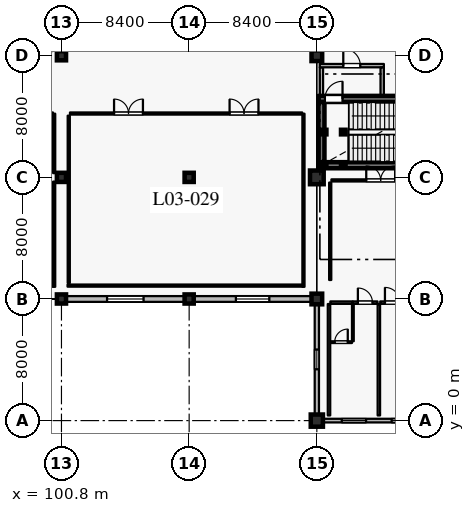
"""IFC4 building model, lengths in metres.
Left out: names, types, materials, properties, quantities, classifications, styles, units other than length and angle.
Written with IfcOpenShell. Run it as: python <this file> out.ifc"""

import sys

from ifc_helpers import new_model, si_unit, direction, frame, frame_2d, origin, origin_2d, place, context, subcontext, project, spatial, rectangle, hollow_rectangle, extrude, element, fill, save


model = new_model("IFC4")
c1 = context("Model", 3, precision=1e-05, world=origin(), true_north=direction((0.0, 1.0)))
c2 = subcontext(c1, "Body", "Model", "MODEL_VIEW")
j1 = project(units=[si_unit("LENGTHUNIT", "METRE"), si_unit("PLANEANGLEUNIT", "RADIAN")], contexts=[c1])
p1 = place(None, origin())
s1 = spatial("IfcSite", under=j1, at=p1, CompositionType="ELEMENT")
p2 = place(p1, origin())
s2 = spatial("IfcBuilding", under=s1, at=p2, CompositionType="ELEMENT")
p3 = place(p2, frame((0.0, 0.0, 16.2)))
s3 = spatial("IfcBuildingStorey", under=s2, at=p3, CompositionType="ELEMENT", Elevation=16.2)
for number, where, z_axis, x_axis in (
    (1, (100.8, 8.0, 0.0), (0.0, 0.0, 1.0), (1.0, 0.0, 0.0)),
    (2, (100.8, 16.0, 0.0), (0.0, 0.0, 1.0), (1.0, 0.0, 0.0)),
    (3, (100.8, 24.0, 0.0), (0.0, 0.0, 1.0), (1.0, 0.0, 0.0)),
    (4, (109.2, 8.0, 0.0), (0.0, 0.0, 1.0), (1.0, 0.0, 0.0)),
    (5, (109.2, 16.0, 0.0), (0.0, 0.0, 1.0), (1.0, 0.0, 0.0)),
):
    element("IfcColumn", number, at=place(p3, frame(where, z_axis=z_axis, x_axis=x_axis)), inside=s3, PredefinedType="COLUMN", context=c2, shape_type="SweptSolid", body=[
        extrude(rectangle(XDim=0.6, YDim=0.6, at=origin_2d()), origin(), (0.0, 0.0, 1.0), 4.8),
    ])
p4 = place(p3, frame((117.6, 0.0, 0.0), z_axis=(0.0, 0.0, 1.0), x_axis=(1.0, 0.0, 0.0)))
e6 = element("IfcColumn", 6, at=p4, inside=s3, PredefinedType="COLUMN", context=c2, shape_type="SweptSolid", body=[
    extrude(rectangle(XDim=0.8, YDim=0.8, at=origin_2d()), origin(), (0.0, 0.0, 1.0), 4.8),
])
p5 = place(p3, frame((117.6, 16.0, 0.0), z_axis=(0.0, 0.0, 1.0), x_axis=(1.0, 0.0, 0.0)))
e7 = element("IfcColumn", 7, at=p5, inside=s3, PredefinedType="COLUMN", context=c2, shape_type="SweptSolid", body=[
    extrude(rectangle(XDim=0.9, YDim=0.9, at=origin_2d()), origin(), (0.0, 0.0, 1.0), 4.8),
])
for number, where, z_axis, x_axis in (
    (8, (117.6, 8.0, 0.0), (0.0, 0.0, 1.0), (1.0, 0.0, 0.0)),
    (9, (117.6, 24.0, 0.0), (0.0, 0.0, 1.0), (1.0, 0.0, 0.0)),
):
    element("IfcColumn", number, at=place(p3, frame(where, z_axis=z_axis, x_axis=x_axis)), inside=s3, PredefinedType="COLUMN", context=c2, shape_type="SweptSolid", body=[
        extrude(rectangle(XDim=0.7, YDim=0.7, at=origin_2d()), origin(), (0.0, 0.0, 1.0), 4.8),
    ])
p6 = place(p3, frame((117.25, 8.0, 0.0), z_axis=(0.0, 0.0, 1.0), x_axis=(-1.0, 0.0, 0.0)))
e10 = element("IfcWall", 10, at=p6, inside=s3, PredefinedType="SOLIDWALL", context=c2, shape_type="SweptSolid", body=[
    extrude(rectangle(XDim=7.75, YDim=0.38, at=frame_2d((3.875, 0.0))), origin(), (0.0, 0.0, 1.0), 3.84),
])
p7 = place(p6, frame((2.775, 0.0, 0.95)))
e11 = element("IfcOpeningElement", 11, at=p7, cuts=e10, PredefinedType="OPENING", context=c2, shape_type="SweptSolid", body=[
    extrude(rectangle(XDim=2.2, YDim=1.75, at=frame_2d((1.1, 0.875))), frame((0.0, 0.2, 0.0), z_axis=(0.0, -1.0, 0.0), x_axis=(1.0, 0.0, 0.0)), (0.0, 0.0, 1.0), 0.4),
])
p8 = place(p3, frame((108.9, 8.0, 0.0), z_axis=(0.0, 0.0, 1.0), x_axis=(-1.0, 0.0, 0.0)))
e12 = element("IfcWall", 12, at=p8, inside=s3, PredefinedType="SOLIDWALL", context=c2, shape_type="SweptSolid", body=[
    extrude(rectangle(XDim=7.8, YDim=0.38, at=frame_2d((3.9, 0.0))), origin(), (0.0, 0.0, 1.0), 3.84),
])
p9 = place(p8, frame((2.7, 0.0, 0.95)))
e13 = element("IfcOpeningElement", 13, at=p9, cuts=e12, PredefinedType="OPENING", context=c2, shape_type="SweptSolid", body=[
    extrude(rectangle(XDim=2.4, YDim=1.65, at=frame_2d((1.2, 0.825))), frame((0.0, 0.2, 0.0), z_axis=(0.0, -1.0, 0.0), x_axis=(1.0, 0.0, 0.0)), (0.0, 0.0, 1.0), 0.4),
])
p10 = place(p3, frame((125.6, 0.0, 0.0), z_axis=(0.0, 0.0, 1.0), x_axis=(-1.0, 0.0, 0.0)))
e14 = element("IfcWall", 14, at=p10, inside=s3, PredefinedType="SOLIDWALL", context=c2, shape_type="SweptSolid", body=[
    extrude(rectangle(XDim=7.6, YDim=0.24, at=frame_2d((3.8, 0.0))), origin(), (0.0, 0.0, 1.0), 4.13),
])
p11 = place(p10, frame((1.48, 0.0, 0.8)))
e15 = element("IfcOpeningElement", 15, at=p11, cuts=e14, PredefinedType="OPENING", context=c2, shape_type="SweptSolid", body=[
    extrude(rectangle(XDim=1.6, YDim=1.6, at=frame_2d((0.8, 0.8))), frame((0.0, 0.13, 0.0), z_axis=(0.0, -1.0, 0.0), x_axis=(1.0, 0.0, 0.0)), (0.0, 0.0, 1.0), 0.26),
])
p12 = place(p10, frame((4.76, 0.0, 0.8)))
e16 = element("IfcOpeningElement", 16, at=p12, cuts=e14, PredefinedType="OPENING", context=c2, shape_type="SweptSolid", body=[
    extrude(rectangle(XDim=1.6, YDim=1.6, at=frame_2d((0.8, 0.8))), frame((0.0, 0.13, 0.0), z_axis=(0.0, -1.0, 0.0), x_axis=(1.0, 0.0, 0.0)), (0.0, 0.0, 1.0), 0.26),
])
p13 = place(p3, frame((117.6, 0.4, 0.0), z_axis=(0.0, 0.0, 1.0), x_axis=(0.0, 1.0, 0.0)))
e17 = element("IfcWall", 17, at=p13, inside=s3, PredefinedType="SOLIDWALL", context=c2, shape_type="SweptSolid", body=[
    extrude(rectangle(XDim=7.25, YDim=0.28, at=frame_2d((3.625, 0.0))), origin(), (0.0, 0.0, 1.0), 3.9),
])
p14 = place(p13, frame((2.975, 0.0, 0.75)))
e18 = element("IfcOpeningElement", 18, at=p14, cuts=e17, PredefinedType="OPENING", context=c2, shape_type="SweptSolid", body=[
    extrude(rectangle(XDim=1.3, YDim=1.65, at=frame_2d((0.65, 0.825))), frame((0.0, 0.15, 0.0), z_axis=(0.0, -1.0, 0.0), x_axis=(1.0, 0.0, 0.0)), (0.0, 0.0, 1.0), 0.3),
])
p15 = place(p3, frame((117.7, 16.8, 0.0), z_axis=(0.0, 0.0, 1.0), x_axis=(1.0, 0.0, 0.0)))
e19 = element("IfcWall", 19, at=p15, inside=s3, PredefinedType="SHEAR", context=c2, shape_type="SweptSolid", body=[
    extrude(rectangle(XDim=8.2, YDim=0.4, at=frame_2d((4.1, 0.0))), origin(), (0.0, 0.0, 1.0), 4.535),
])
p16 = place(p3, frame((117.7, 21.16, 0.0), z_axis=(0.0, 0.0, 1.0), x_axis=(1.0, 0.0, 0.0)))
e20 = element("IfcWall", 20, at=p16, inside=s3, PredefinedType="SHEAR", context=c2, shape_type="SweptSolid", body=[
    extrude(rectangle(XDim=8.2, YDim=0.4, at=frame_2d((4.1, 0.0))), origin(), (0.0, 0.0, 1.0), 4.535),
])
p17 = place(p16, frame((0.43, 0.0, 0.0)))
e21 = element("IfcOpeningElement", 21, at=p17, cuts=e20, PredefinedType="OPENING", context=c2, shape_type="SweptSolid", body=[
    extrude(rectangle(XDim=1.16, YDim=2.2, at=frame_2d((0.58, 1.1))), frame((0.0, 0.21, 0.0), z_axis=(0.0, -1.0, 0.0), x_axis=(1.0, 0.0, 0.0)), (0.0, 0.0, 1.0), 0.42),
])
p18 = place(p3, frame((117.9, 17.005, 0.0), z_axis=(0.0, 0.0, 1.0), x_axis=(0.0, 1.0, 0.0)))
e22 = element("IfcWall", 22, at=p18, inside=s3, PredefinedType="SHEAR", context=c2, shape_type="SweptSolid", body=[
    extrude(rectangle(XDim=3.95, YDim=0.4, at=frame_2d((1.975, 0.0))), origin(), (0.0, 0.0, 1.0), 4.535),
])
p19 = place(p3, frame((117.9, 21.365, 0.0), z_axis=(0.0, 0.0, 1.0), x_axis=(0.0, 1.0, 0.0)))
e23 = element("IfcWall", 23, at=p19, inside=s3, PredefinedType="PARTITIONING", context=c2, shape_type="SweptSolid", body=[
    extrude(rectangle(XDim=1.87, YDim=0.22, at=frame_2d((0.935, 0.0))), origin(), (0.0, 0.0, 1.0), 4.535),
])
p20 = place(p3, frame((117.79, 23.35, 0.0), z_axis=(0.0, 0.0, 1.0), x_axis=(1.0, 0.0, 0.0)))
e24 = element("IfcWall", 24, at=p20, inside=s3, PredefinedType="PARTITIONING", context=c2, shape_type="SweptSolid", body=[
    extrude(rectangle(XDim=4.22, YDim=0.22, at=frame_2d((2.11, 0.0))), origin(), (0.0, 0.0, 1.0), 4.535),
])
p21 = place(p20, frame((1.55, 0.0, 0.0)))
e25 = element("IfcOpeningElement", 25, at=p21, cuts=e24, PredefinedType="OPENING", context=c2, shape_type="SweptSolid", body=[
    extrude(rectangle(XDim=1.12, YDim=2.2, at=frame_2d((0.56, 1.1))), frame((0.0, 0.12, 0.0), z_axis=(0.0, -1.0, 0.0), x_axis=(1.0, 0.0, 0.0)), (0.0, 0.0, 1.0), 0.24),
])
p22 = place(p3, frame((121.9, 21.365, 0.0), z_axis=(0.0, 0.0, 1.0), x_axis=(0.0, 1.0, 0.0)))
e26 = element("IfcWall", 26, at=p22, inside=s3, PredefinedType="PARTITIONING", context=c2, shape_type="SweptSolid", body=[
    extrude(rectangle(XDim=1.87, YDim=0.22, at=frame_2d((0.935, 0.0))), origin(), (0.0, 0.0, 1.0), 4.535),
])
for number, where, z_axis, x_axis in (
    (27, (118.08, 16.8, 0.0), (0.0, 0.0, 1.0), (1.0, 0.0, 0.0)),
    (28, (118.08, 18.98, 0.0), (0.0, 0.0, 1.0), (1.0, 0.0, 0.0)),
    (29, (119.34, 16.8, 0.0), (0.0, 0.0, 1.0), (1.0, 0.0, 0.0)),
    (30, (119.34, 18.98, 0.0), (0.0, 0.0, 1.0), (1.0, 0.0, 0.0)),
):
    element("IfcColumn", number, at=place(p3, frame(where, z_axis=z_axis, x_axis=x_axis)), inside=s3, PredefinedType="COLUMN", context=c2, shape_type="SweptSolid", body=[
        extrude(hollow_rectangle(XDim=0.3, YDim=0.3, WallThickness=0.012, at=origin_2d()), origin(), (0.0, 0.0, 1.0), 4.62),
    ])
p23 = place(p3, frame((118.49, 7.76, 0.0), z_axis=(0.0, 0.0, 1.0), x_axis=(1.0, 0.0, 0.0)))
e31 = element("IfcWall", 31, at=p23, inside=s3, PredefinedType="PARTITIONING", context=c2, shape_type="SweptSolid", body=[
    extrude(rectangle(XDim=1.47, YDim=0.16, at=frame_2d((0.735, 0.0))), origin(), (0.0, 0.0, 1.0), 4.535),
])
p24 = place(p3, frame((119.97, 7.76, 0.0), z_axis=(0.0, 0.0, 1.0), x_axis=(1.0, 0.0, 0.0)))
e32 = element("IfcWall", 32, at=p24, inside=s3, PredefinedType="PARTITIONING", context=c2, shape_type="SweptSolid", body=[
    extrude(rectangle(XDim=1.62, YDim=0.16, at=frame_2d((0.81, 0.0))), origin(), (0.0, 0.0, 1.0), 4.535),
])
p25 = place(p24, frame((0.33, 0.0, 0.0)))
e33 = element("IfcOpeningElement", 33, at=p25, cuts=e32, PredefinedType="OPENING", context=c2, shape_type="SweptSolid", body=[
    extrude(rectangle(XDim=0.96, YDim=2.2, at=frame_2d((0.48, 1.1))), frame((0.0, 0.09, 0.0), z_axis=(0.0, -1.0, 0.0), x_axis=(1.0, 0.0, 0.0)), (0.0, 0.0, 1.0), 0.18),
])
p26 = place(p3, frame((119.97, 5.22, 0.0), z_axis=(0.0, 0.0, 1.0), x_axis=(0.0, 1.0, 0.0)))
e34 = element("IfcWall", 34, at=p26, inside=s3, PredefinedType="PARTITIONING", context=c2, shape_type="SweptSolid", body=[
    extrude(rectangle(XDim=2.45, YDim=0.115, at=frame_2d((1.225, 0.0))), origin(), (0.0, 0.0, 1.0), 4.535),
])
p27 = place(p3, frame((118.5, 5.16, 0.0), z_axis=(0.0, 0.0, 1.0), x_axis=(1.0, 0.0, 0.0)))
e35 = element("IfcWall", 35, at=p27, inside=s3, PredefinedType="PARTITIONING", context=c2, shape_type="SweptSolid", body=[
    extrude(rectangle(XDim=1.41, YDim=0.115, at=frame_2d((0.705, 0.0))), origin(), (0.0, 0.0, 1.0), 4.535),
])
p28 = place(p27, frame((0.275, 0.0, 0.0)))
e36 = element("IfcOpeningElement", 36, at=p28, cuts=e35, PredefinedType="OPENING", context=c2, shape_type="SweptSolid", body=[
    extrude(rectangle(XDim=0.86, YDim=2.12, at=frame_2d((0.43, 1.06))), frame((0.0, 0.067, 0.0), z_axis=(0.0, -1.0, 0.0), x_axis=(1.0, 0.0, 0.0)), (0.0, 0.0, 1.0), 0.135),
])
p29 = place(p3, frame((118.4, 0.34, 0.0), z_axis=(0.0, 0.0, 1.0), x_axis=(0.0, 1.0, 0.0)))
e37 = element("IfcWall", 37, at=p29, inside=s3, PredefinedType="PARTITIONING", context=c2, shape_type="SweptSolid", body=[
    extrude(rectangle(XDim=7.33, YDim=0.16, at=frame_2d((3.665, 0.0))), origin(), (0.0, 0.0, 1.0), 4.535),
])
p30 = place(p3, frame((121.77, 7.76, 0.0), z_axis=(0.0, 0.0, 1.0), x_axis=(1.0, 0.0, 0.0)))
e38 = element("IfcWall", 38, at=p30, inside=s3, PredefinedType="PARTITIONING", context=c2, shape_type="SweptSolid", body=[
    extrude(rectangle(XDim=1.62, YDim=0.16, at=frame_2d((0.81, 0.0))), origin(), (0.0, 0.0, 1.0), 4.535),
])
p31 = place(p30, frame((0.31, 0.0, 0.0)))
e39 = element("IfcOpeningElement", 39, at=p31, cuts=e38, PredefinedType="OPENING", context=c2, shape_type="SweptSolid", body=[
    extrude(rectangle(XDim=1.0, YDim=2.25, at=frame_2d((0.5, 1.125))), frame((0.0, 0.09, 0.0), z_axis=(0.0, -1.0, 0.0), x_axis=(1.0, 0.0, 0.0)), (0.0, 0.0, 1.0), 0.18),
])
p32 = place(p3, frame((121.68, 0.34, 0.0), z_axis=(0.0, 0.0, 1.0), x_axis=(0.0, 1.0, 0.0)))
e40 = element("IfcWall", 40, at=p32, inside=s3, PredefinedType="PARTITIONING", context=c2, shape_type="SweptSolid", body=[
    extrude(rectangle(XDim=7.33, YDim=0.16, at=frame_2d((3.665, 0.0))), origin(), (0.0, 0.0, 1.0), 4.535),
])
p33 = place(p3, frame((84.56, 20.2, 0.0), z_axis=(0.0, 0.0, 1.0), x_axis=(1.0, 0.0, 0.0)))
e41 = element("IfcWall", 41, at=p33, inside=s3, PredefinedType="PARTITIONING", context=c2, shape_type="SweptSolid", body=[
    extrude(rectangle(XDim=15.68, YDim=0.14, at=frame_2d((7.84, 0.0))), origin(), (0.0, 0.0, 1.0), 4.535),
])
p34 = place(p33, frame((6.89, 0.0, 0.0)))
e42 = element("IfcOpeningElement", 42, at=p34, cuts=e41, PredefinedType="OPENING", context=c2, shape_type="SweptSolid", body=[
    extrude(rectangle(XDim=1.9, YDim=2.4, at=frame_2d((0.95, 1.2))), frame((0.0, 0.08, 0.0), z_axis=(0.0, -1.0, 0.0), x_axis=(1.0, 0.0, 0.0)), (0.0, 0.0, 1.0), 0.16),
])
p35 = place(p3, frame((101.36, 20.2, 0.0), z_axis=(0.0, 0.0, 1.0), x_axis=(1.0, 0.0, 0.0)))
e43 = element("IfcWall", 43, at=p35, inside=s3, PredefinedType="PARTITIONING", context=c2, shape_type="SweptSolid", body=[
    extrude(rectangle(XDim=15.28, YDim=0.14, at=frame_2d((7.64, 0.0))), origin(), (0.0, 0.0, 1.0), 4.535),
])
p36 = place(p35, frame((2.9, 0.0, 0.0)))
e44 = element("IfcOpeningElement", 44, at=p36, cuts=e43, PredefinedType="OPENING", context=c2, shape_type="SweptSolid", body=[
    extrude(rectangle(XDim=1.9, YDim=2.4, at=frame_2d((0.95, 1.2))), frame((0.0, 0.08, 0.0), z_axis=(0.0, -1.0, 0.0), x_axis=(1.0, 0.0, 0.0)), (0.0, 0.0, 1.0), 0.16),
])
p37 = place(p35, frame((10.5, 0.0, 0.0)))
e45 = element("IfcOpeningElement", 45, at=p37, cuts=e43, PredefinedType="OPENING", context=c2, shape_type="SweptSolid", body=[
    extrude(rectangle(XDim=1.9, YDim=2.4, at=frame_2d((0.95, 1.2))), frame((0.0, 0.08, 0.0), z_axis=(0.0, -1.0, 0.0), x_axis=(1.0, 0.0, 0.0)), (0.0, 0.0, 1.0), 0.16),
])
p38 = place(p3, frame((101.28, 9.05, 0.0), z_axis=(0.0, 0.0, 1.0), x_axis=(0.0, 1.0, 0.0)))
e46 = element("IfcWall", 46, at=p38, inside=s3, PredefinedType="PARTITIONING", context=c2, shape_type="SweptSolid", body=[
    extrude(rectangle(XDim=11.01, YDim=0.14, at=frame_2d((5.505, 0.0))), origin(), (0.0, 0.0, 1.0), 4.535),
])
p39 = place(p3, frame((118.56, 15.8, 0.0), z_axis=(0.0, 0.0, 1.0), x_axis=(1.0, 0.0, 0.0)))
e47 = element("IfcWall", 47, at=p39, inside=s3, PredefinedType="PARTITIONING", context=c2, shape_type="SweptSolid", body=[
    extrude(rectangle(XDim=6.48, YDim=0.14, at=frame_2d((3.24, 0.0))), origin(), (0.0, 0.0, 1.0), 4.535),
])
p40 = place(p39, frame((2.29, 0.0, 0.0)))
e48 = element("IfcOpeningElement", 48, at=p40, cuts=e47, PredefinedType="OPENING", context=c2, shape_type="SweptSolid", body=[
    extrude(rectangle(XDim=1.9, YDim=2.4, at=frame_2d((0.95, 1.2))), frame((0.0, 0.08, 0.0), z_axis=(0.0, -1.0, 0.0), x_axis=(1.0, 0.0, 0.0)), (0.0, 0.0, 1.0), 0.16),
])
p41 = place(p3, frame((118.48, 9.25, 0.0), z_axis=(0.0, 0.0, 1.0), x_axis=(0.0, 1.0, 0.0)))
e49 = element("IfcWall", 49, at=p41, inside=s3, PredefinedType="PARTITIONING", context=c2, shape_type="SweptSolid", body=[
    extrude(rectangle(XDim=6.41, YDim=0.14, at=frame_2d((3.205, 0.0))), origin(), (0.0, 0.0, 1.0), 4.535),
])
p42 = place(p3, frame((100.32, 8.8, 0.0), z_axis=(0.0, 0.0, 1.0), x_axis=(0.0, 1.0, 0.0)))
e50 = element("IfcWall", 50, at=p42, inside=s3, PredefinedType="PARTITIONING", context=c2, shape_type="SweptSolid", body=[
    extrude(rectangle(XDim=6.921, YDim=0.14, at=frame_2d((3.46, 0.0))), origin(), (0.0, 0.0, 1.0), 4.535),
])
p43 = place(p3, frame((100.32, 16.279, 0.0), z_axis=(0.0, 0.0, 1.0), x_axis=(0.0, 1.0, 0.0)))
e51 = element("IfcWall", 51, at=p43, inside=s3, PredefinedType="PARTITIONING", context=c2, shape_type="SweptSolid", body=[
    extrude(rectangle(XDim=3.909, YDim=0.14, at=frame_2d((1.955, 0.0))), origin(), (0.0, 0.0, 1.0), 4.535),
])
p44 = place(p3, frame((84.4, 8.88, 0.0), z_axis=(0.0, 0.0, 1.0), x_axis=(1.0, 0.0, 0.0)))
e52 = element("IfcWall", 52, at=p44, inside=s3, PredefinedType="PARTITIONING", context=c2, shape_type="SweptSolid", body=[
    extrude(rectangle(XDim=15.85, YDim=0.14, at=frame_2d((7.925, 0.0))), origin(), (0.0, 0.0, 1.0), 4.535),
])
p45 = place(p3, frame((116.72, 8.8, 0.0), z_axis=(0.0, 0.0, 1.0), x_axis=(0.0, 1.0, 0.0)))
e53 = element("IfcWall", 53, at=p45, inside=s3, PredefinedType="PARTITIONING", context=c2, shape_type="SweptSolid", body=[
    extrude(rectangle(XDim=11.388, YDim=0.14, at=frame_2d((5.694, 0.0))), origin(), (0.0, 0.0, 1.0), 4.535),
])
p46 = place(p3, frame((101.2, 8.88, 0.0), z_axis=(0.0, 0.0, 1.0), x_axis=(1.0, 0.0, 0.0)))
e54 = element("IfcWall", 54, at=p46, inside=s3, PredefinedType="PARTITIONING", context=c2, shape_type="SweptSolid", body=[
    extrude(rectangle(XDim=15.45, YDim=0.14, at=frame_2d((7.725, 0.0))), origin(), (0.0, 0.0, 1.0), 4.535),
])
p47 = place(p7, origin())
e55 = element("IfcWindow", 55, at=p47, inside=s3, PartitioningType="DOUBLE_PANEL_VERTICAL", PredefinedType="WINDOW", context=c2, shape_type="SweptSolid", body=[
    extrude(rectangle(XDim=2.2, YDim=1.75, at=frame_2d((1.1, 0.875))), frame((0.0, 0.03, 0.0), z_axis=(0.0, -1.0, 0.0), x_axis=(1.0, 0.0, 0.0)), (0.0, 0.0, 1.0), 0.06),
])
fill(e11, e55)
p48 = place(p9, origin())
e56 = element("IfcWindow", 56, at=p48, inside=s3, PartitioningType="DOUBLE_PANEL_VERTICAL", PredefinedType="WINDOW", context=c2, shape_type="SweptSolid", body=[
    extrude(rectangle(XDim=2.4, YDim=1.65, at=frame_2d((1.2, 0.825))), frame((0.0, 0.03, 0.0), z_axis=(0.0, -1.0, 0.0), x_axis=(1.0, 0.0, 0.0)), (0.0, 0.0, 1.0), 0.06),
])
fill(e13, e56)
p49 = place(p11, origin())
e57 = element("IfcWindow", 57, at=p49, inside=s3, PartitioningType="SINGLE_PANEL", PredefinedType="WINDOW", context=c2, shape_type="SweptSolid", body=[
    extrude(rectangle(XDim=1.6, YDim=1.6, at=frame_2d((0.8, 0.8))), frame((0.0, 0.03, 0.0), z_axis=(0.0, -1.0, 0.0), x_axis=(1.0, 0.0, 0.0)), (0.0, 0.0, 1.0), 0.06),
])
fill(e15, e57)
p50 = place(p12, origin())
e58 = element("IfcWindow", 58, at=p50, inside=s3, PartitioningType="SINGLE_PANEL", PredefinedType="WINDOW", context=c2, shape_type="SweptSolid", body=[
    extrude(rectangle(XDim=1.6, YDim=1.6, at=frame_2d((0.8, 0.8))), frame((0.0, 0.03, 0.0), z_axis=(0.0, -1.0, 0.0), x_axis=(1.0, 0.0, 0.0)), (0.0, 0.0, 1.0), 0.06),
])
fill(e16, e58)
p51 = place(p14, origin())
e59 = element("IfcWindow", 59, at=p51, inside=s3, PartitioningType="SINGLE_PANEL", PredefinedType="WINDOW", context=c2, shape_type="SweptSolid", body=[
    extrude(rectangle(XDim=1.3, YDim=1.65, at=frame_2d((0.65, 0.825))), frame((0.0, 0.03, 0.0), z_axis=(0.0, -1.0, 0.0), x_axis=(1.0, 0.0, 0.0)), (0.0, 0.0, 1.0), 0.06),
])
fill(e18, e59)
p52 = place(p17, origin())
e60 = element("IfcDoor", 60, at=p52, inside=s3, OperationType="SINGLE_SWING_RIGHT", PredefinedType="DOOR", context=c2, shape_type="SweptSolid", body=[
    extrude(rectangle(XDim=1.16, YDim=2.2, at=frame_2d((0.58, 1.1))), frame((0.0, 0.025, 0.0), z_axis=(0.0, -1.0, 0.0), x_axis=(1.0, 0.0, 0.0)), (0.0, 0.0, 1.0), 0.05),
])
fill(e21, e60)
p53 = place(p21, origin())
e61 = element("IfcDoor", 61, at=p53, inside=s3, OperationType="SINGLE_SWING_LEFT", PredefinedType="DOOR", context=c2, shape_type="SweptSolid", body=[
    extrude(rectangle(XDim=1.12, YDim=2.2, at=frame_2d((0.56, 1.1))), frame((0.0, 0.025, 0.0), z_axis=(0.0, -1.0, 0.0), x_axis=(1.0, 0.0, 0.0)), (0.0, 0.0, 1.0), 0.05),
])
fill(e25, e61)
p54 = place(p25, origin())
e62 = element("IfcDoor", 62, at=p54, inside=s3, OperationType="SINGLE_SWING_LEFT", PredefinedType="DOOR", context=c2, shape_type="SweptSolid", body=[
    extrude(rectangle(XDim=0.96, YDim=2.2, at=frame_2d((0.48, 1.1))), frame((0.0, 0.025, 0.0), z_axis=(0.0, -1.0, 0.0), x_axis=(1.0, 0.0, 0.0)), (0.0, 0.0, 1.0), 0.05),
])
fill(e33, e62)
p55 = place(p28, origin())
e63 = element("IfcDoor", 63, at=p55, inside=s3, OperationType="SINGLE_SWING_RIGHT", PredefinedType="DOOR", context=c2, shape_type="SweptSolid", body=[
    extrude(rectangle(XDim=0.86, YDim=2.12, at=frame_2d((0.43, 1.06))), frame((0.0, 0.025, 0.0), z_axis=(0.0, -1.0, 0.0), x_axis=(1.0, 0.0, 0.0)), (0.0, 0.0, 1.0), 0.05),
])
fill(e36, e63)
p56 = place(p31, origin())
e64 = element("IfcDoor", 64, at=p56, inside=s3, OperationType="SINGLE_SWING_LEFT", PredefinedType="DOOR", context=c2, shape_type="SweptSolid", body=[
    extrude(rectangle(XDim=1.0, YDim=2.25, at=frame_2d((0.5, 1.125))), frame((0.0, 0.025, 0.0), z_axis=(0.0, -1.0, 0.0), x_axis=(1.0, 0.0, 0.0)), (0.0, 0.0, 1.0), 0.05),
])
fill(e39, e64)
p57 = place(p36, origin())
e65 = element("IfcDoor", 65, at=p57, inside=s3, OperationType="DOUBLE_DOOR_SINGLE_SWING", PredefinedType="DOOR", context=c2, shape_type="SweptSolid", body=[
    extrude(rectangle(XDim=1.9, YDim=2.4, at=frame_2d((0.95, 1.2))), frame((0.0, 0.025, 0.0), z_axis=(0.0, -1.0, 0.0), x_axis=(1.0, 0.0, 0.0)), (0.0, 0.0, 1.0), 0.05),
])
fill(e44, e65)
p58 = place(p40, origin())
e66 = element("IfcDoor", 66, at=p58, inside=s3, OperationType="DOUBLE_DOOR_SINGLE_SWING", PredefinedType="DOOR", context=c2, shape_type="SweptSolid", body=[
    extrude(rectangle(XDim=1.9, YDim=2.4, at=frame_2d((0.95, 1.2))), frame((0.0, 0.025, 0.0), z_axis=(0.0, -1.0, 0.0), x_axis=(1.0, 0.0, 0.0)), (0.0, 0.0, 1.0), 0.05),
])
fill(e48, e66)
p59 = place(p37, origin())
e67 = element("IfcDoor", 67, at=p59, inside=s3, OperationType="DOUBLE_DOOR_SINGLE_SWING", PredefinedType="DOOR", context=c2, shape_type="SweptSolid", body=[
    extrude(rectangle(XDim=1.9, YDim=2.4, at=frame_2d((0.95, 1.2))), frame((0.0, 0.025, 0.0), z_axis=(0.0, -1.0, 0.0), x_axis=(1.0, 0.0, 0.0)), (0.0, 0.0, 1.0), 0.05),
])
fill(e45, e67)
save(model, sys.argv[1])
